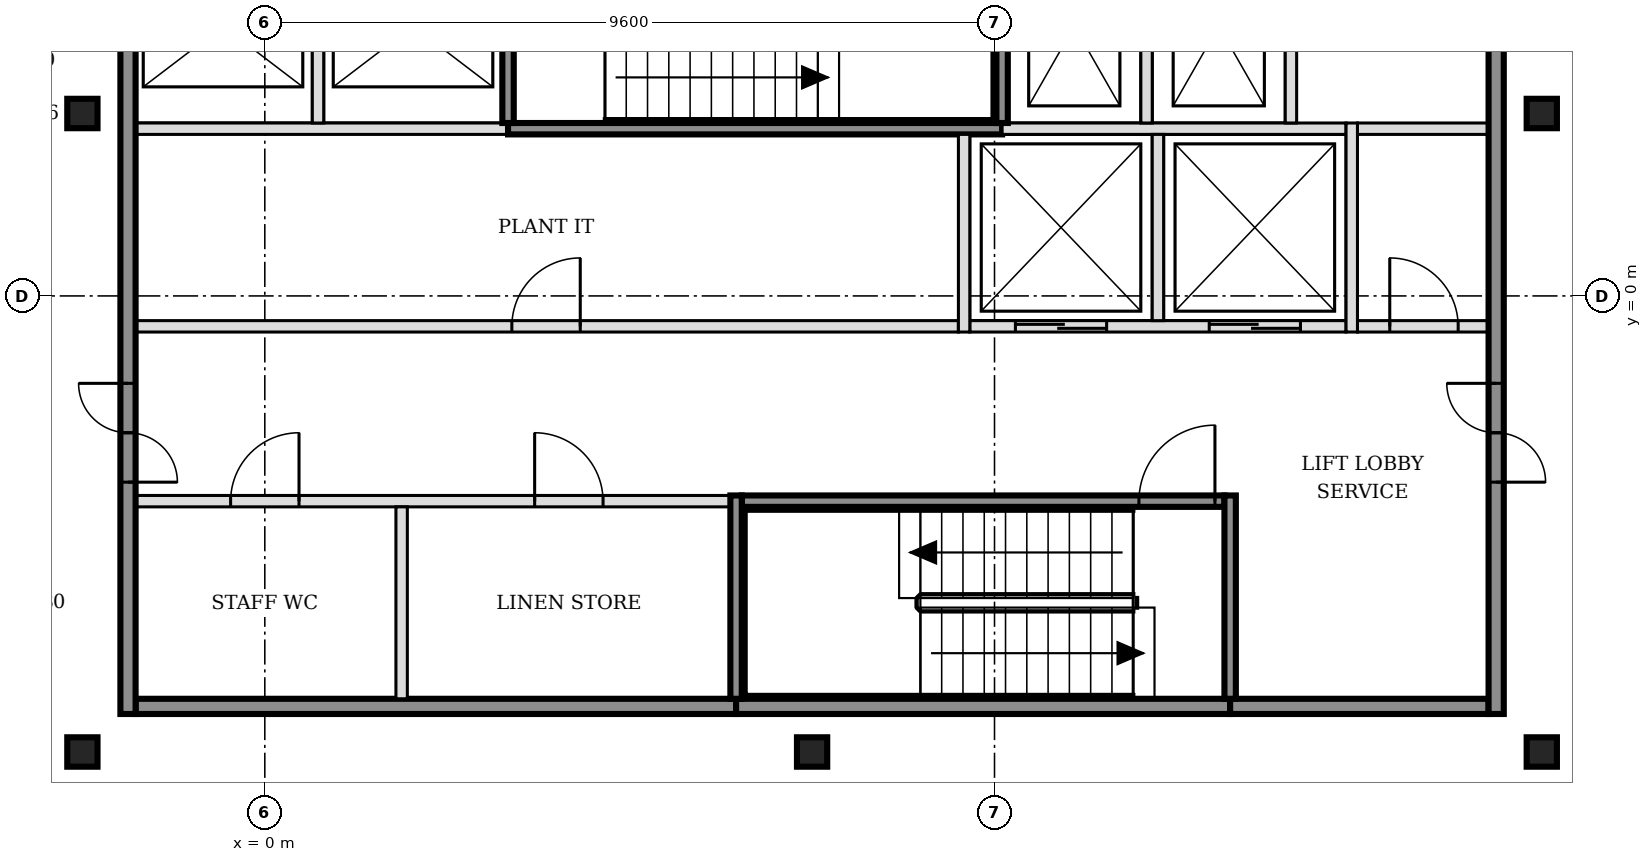
"""IFC4 building model, lengths in metres.
Left out: names, types, materials, properties, quantities, classifications, styles, units other than length and angle.
Written with IfcOpenShell. Run it as: python <this file> out.ifc"""

import sys

from ifc_helpers import new_model, si_unit, direction, frame, frame_2d, origin, origin_2d, place, context, subcontext, project, spatial, rectangle, i_section, extrude, element, fill, save


model = new_model("IFC4")
c1 = context("Model", 3, precision=1e-05, world=origin(), true_north=direction((0.0, 1.0)))
c2 = subcontext(c1, "Body", "Model", "MODEL_VIEW")
j1 = project(units=[si_unit("LENGTHUNIT", "METRE"), si_unit("PLANEANGLEUNIT", "RADIAN")], contexts=[c1])
p1 = place(None, origin())
s1 = spatial("IfcSite", under=j1, at=p1, CompositionType="ELEMENT")
p2 = place(p1, origin())
s2 = spatial("IfcBuilding", under=s1, at=p2, CompositionType="ELEMENT")
p3 = place(p2, frame((0.0, 0.0, 246.6)))
s3 = spatial("IfcBuildingStorey", under=s2, at=p3, CompositionType="ELEMENT", Elevation=246.6)
for number, where, z_axis, x_axis in (
    (1, (-2.4, -6.0, -0.15), (0.0, 0.0, 1.0), (1.0, 0.0, 0.0)),
    (2, (7.2, -6.0, -0.15), (0.0, 0.0, 1.0), (1.0, 0.0, 0.0)),
    (3, (16.8, -6.0, -0.15), (0.0, 0.0, 1.0), (1.0, 0.0, 0.0)),
    (4, (-2.4, 2.4, -0.15), (0.0, 0.0, 1.0), (1.0, 0.0, 0.0)),
    (5, (16.8, 2.4, -0.15), (0.0, 0.0, 1.0), (1.0, 0.0, 0.0)),
):
    element("IfcColumn", number, at=place(p3, frame(where, z_axis=z_axis, x_axis=x_axis)), inside=s3, PredefinedType="COLUMN", context=c2, shape_type="SweptSolid", body=[
        extrude(i_section(OverallWidth=0.398, OverallDepth=0.387, WebThickness=0.021, FlangeThickness=0.033, FilletRadius=0.015, at=origin_2d()), origin(), (0.0, 0.0, 1.0), 3.6),
    ])
p4 = place(p3, frame((-1.7, -5.4, 0.0), z_axis=(0.0, 0.0, 1.0), x_axis=(1.0, 0.0, 0.0)))
e6 = element("IfcWall", 6, at=p4, inside=s3, PredefinedType="SOLIDWALL", context=c2, shape_type="SweptSolid", body=[
    extrude(rectangle(XDim=7.9, YDim=0.2, at=frame_2d((3.95, 0.0))), origin(), (0.0, 0.0, 1.0), 3.45),
])
p5 = place(p3, frame((6.2, -5.4, 0.0), z_axis=(0.0, 0.0, 1.0), x_axis=(1.0, 0.0, 0.0)))
e7 = element("IfcWall", 7, at=p5, inside=s3, PredefinedType="SOLIDWALL", context=c2, shape_type="SweptSolid", body=[
    extrude(rectangle(XDim=6.5, YDim=0.2, at=frame_2d((3.25, 0.0))), origin(), (0.0, 0.0, 1.0), 3.45),
])
p6 = place(p3, frame((12.7, -5.4, 0.0), z_axis=(0.0, 0.0, 1.0), x_axis=(1.0, 0.0, 0.0)))
e8 = element("IfcWall", 8, at=p6, inside=s3, PredefinedType="SOLIDWALL", context=c2, shape_type="SweptSolid", body=[
    extrude(rectangle(XDim=3.4, YDim=0.2, at=frame_2d((1.7, 0.0))), origin(), (0.0, 0.0, 1.0), 3.45),
])
p7 = place(p3, frame((-1.7, -2.7, 0.0), z_axis=(0.0, 0.0, 1.0), x_axis=(1.0, 0.0, 0.0)))
e9 = element("IfcWall", 9, at=p7, inside=s3, PredefinedType="PARTITIONING", context=c2, shape_type="SweptSolid", body=[
    extrude(rectangle(XDim=7.825, YDim=0.15, at=frame_2d((3.913, 0.0))), origin(), (0.0, 0.0, 1.0), 3.45),
])
p8 = place(p7, frame((1.25, 0.0, 0.0)))
e10 = element("IfcOpeningElement", 10, at=p8, cuts=e9, PredefinedType="OPENING", context=c2, shape_type="SweptSolid", body=[
    extrude(rectangle(XDim=0.9, YDim=2.1, at=frame_2d((0.45, 1.05))), frame((0.0, 0.085, 0.0), z_axis=(0.0, -1.0, 0.0), x_axis=(1.0, 0.0, 0.0)), (0.0, 0.0, 1.0), 0.17),
])
p9 = place(p7, frame((5.25, 0.0, 0.0)))
e11 = element("IfcOpeningElement", 11, at=p9, cuts=e9, PredefinedType="OPENING", context=c2, shape_type="SweptSolid", body=[
    extrude(rectangle(XDim=0.9, YDim=2.1, at=frame_2d((0.45, 1.05))), frame((0.0, 0.085, 0.0), z_axis=(0.0, -1.0, 0.0), x_axis=(1.0, 0.0, 0.0)), (0.0, 0.0, 1.0), 0.17),
])
p10 = place(p3, frame((6.275, -2.7, 0.0), z_axis=(0.0, 0.0, 1.0), x_axis=(1.0, 0.0, 0.0)))
e12 = element("IfcWall", 12, at=p10, inside=s3, PredefinedType="SOLIDWALL", context=c2, shape_type="SweptSolid", body=[
    extrude(rectangle(XDim=6.35, YDim=0.15, at=frame_2d((3.175, 0.0))), origin(), (0.0, 0.0, 1.0), 3.45),
])
p11 = place(p10, frame((5.225, 0.0, 0.0)))
e13 = element("IfcOpeningElement", 13, at=p11, cuts=e12, PredefinedType="OPENING", context=c2, shape_type="SweptSolid", body=[
    extrude(rectangle(XDim=1.0, YDim=2.1, at=frame_2d((0.5, 1.05))), frame((0.0, 0.085, 0.0), z_axis=(0.0, -1.0, 0.0), x_axis=(1.0, 0.0, 0.0)), (0.0, 0.0, 1.0), 0.17),
])
p12 = place(p3, frame((-1.7, -0.4, 0.0), z_axis=(0.0, 0.0, 1.0), x_axis=(1.0, 0.0, 0.0)))
e14 = element("IfcWall", 14, at=p12, inside=s3, PredefinedType="PARTITIONING", context=c2, shape_type="SweptSolid", body=[
    extrude(rectangle(XDim=10.825, YDim=0.15, at=frame_2d((5.413, 0.0))), origin(), (0.0, 0.0, 1.0), 3.45),
])
p13 = place(p12, frame((4.95, 0.0, 0.0)))
e15 = element("IfcOpeningElement", 15, at=p13, cuts=e14, PredefinedType="OPENING", context=c2, shape_type="SweptSolid", body=[
    extrude(rectangle(XDim=0.9, YDim=2.1, at=frame_2d((0.45, 1.05))), frame((0.0, 0.085, 0.0), z_axis=(0.0, -1.0, 0.0), x_axis=(1.0, 0.0, 0.0)), (0.0, 0.0, 1.0), 0.17),
])
p14 = place(p3, frame((9.275, -0.4, 0.0), z_axis=(0.0, 0.0, 1.0), x_axis=(1.0, 0.0, 0.0)))
e16 = element("IfcWall", 16, at=p14, inside=s3, PredefinedType="SOLIDWALL", context=c2, shape_type="SweptSolid", body=[
    extrude(rectangle(XDim=4.95, YDim=0.15, at=frame_2d((2.475, 0.0))), origin(), (0.0, 0.0, 1.0), 3.45),
])
p15 = place(p14, frame((0.6, 0.0, 0.0)))
e17 = element("IfcOpeningElement", 17, at=p15, cuts=e16, PredefinedType="OPENING", context=c2, shape_type="SweptSolid", body=[
    extrude(rectangle(XDim=1.2, YDim=2.1, at=frame_2d((0.6, 1.05))), frame((0.0, 0.085, 0.0), z_axis=(0.0, -1.0, 0.0), x_axis=(1.0, 0.0, 0.0)), (0.0, 0.0, 1.0), 0.17),
])
p16 = place(p14, frame((3.15, 0.0, 0.0)))
e18 = element("IfcOpeningElement", 18, at=p16, cuts=e16, PredefinedType="OPENING", context=c2, shape_type="SweptSolid", body=[
    extrude(rectangle(XDim=1.2, YDim=2.1, at=frame_2d((0.6, 1.05))), frame((0.0, 0.085, 0.0), z_axis=(0.0, -1.0, 0.0), x_axis=(1.0, 0.0, 0.0)), (0.0, 0.0, 1.0), 0.17),
])
p17 = place(p3, frame((14.375, -0.4, 0.0), z_axis=(0.0, 0.0, 1.0), x_axis=(1.0, 0.0, 0.0)))
e19 = element("IfcWall", 19, at=p17, inside=s3, PredefinedType="PARTITIONING", context=c2, shape_type="SweptSolid", body=[
    extrude(rectangle(XDim=1.725, YDim=0.15, at=frame_2d((0.863, 0.0))), origin(), (0.0, 0.0, 1.0), 3.45),
])
p18 = place(p17, frame((0.425, 0.0, 0.0)))
e20 = element("IfcOpeningElement", 20, at=p18, cuts=e19, PredefinedType="OPENING", context=c2, shape_type="SweptSolid", body=[
    extrude(rectangle(XDim=0.9, YDim=2.1, at=frame_2d((0.45, 1.05))), frame((0.0, 0.085, 0.0), z_axis=(0.0, -1.0, 0.0), x_axis=(1.0, 0.0, 0.0)), (0.0, 0.0, 1.0), 0.17),
])
p19 = place(p3, frame((-1.7, 2.2, 0.0), z_axis=(0.0, 0.0, 1.0), x_axis=(1.0, 0.0, 0.0)))
e21 = element("IfcWall", 21, at=p19, inside=s3, PredefinedType="SOLIDWALL", context=c2, shape_type="SweptSolid", body=[
    extrude(rectangle(XDim=4.9, YDim=0.15, at=frame_2d((2.45, 0.0))), origin(), (0.0, 0.0, 1.0), 3.45),
])
p20 = place(p3, frame((3.2, 2.2, 0.0), z_axis=(0.0, 0.0, 1.0), x_axis=(1.0, 0.0, 0.0)))
e22 = element("IfcWall", 22, at=p20, inside=s3, PredefinedType="SOLIDWALL", context=c2, shape_type="SweptSolid", body=[
    extrude(rectangle(XDim=6.5, YDim=0.15, at=frame_2d((3.25, 0.0))), origin(), (0.0, 0.0, 1.0), 3.45),
])
p21 = place(p3, frame((9.7, 2.2, 0.0), z_axis=(0.0, 0.0, 1.0), x_axis=(1.0, 0.0, 0.0)))
e23 = element("IfcWall", 23, at=p21, inside=s3, PredefinedType="SOLIDWALL", context=c2, shape_type="SweptSolid", body=[
    extrude(rectangle(XDim=4.525, YDim=0.15, at=frame_2d((2.263, 0.0))), origin(), (0.0, 0.0, 1.0), 3.45),
])
p22 = place(p3, frame((14.375, 2.2, 0.0), z_axis=(0.0, 0.0, 1.0), x_axis=(1.0, 0.0, 0.0)))
e24 = element("IfcWall", 24, at=p22, inside=s3, PredefinedType="PARTITIONING", context=c2, shape_type="SweptSolid", body=[
    extrude(rectangle(XDim=1.725, YDim=0.15, at=frame_2d((0.863, 0.0))), origin(), (0.0, 0.0, 1.0), 3.45),
])
p23 = place(p3, frame((-1.8, -5.5, 0.0), z_axis=(0.0, 0.0, 1.0), x_axis=(0.0, 1.0, 0.0)))
e25 = element("IfcWall", 25, at=p23, inside=s3, PredefinedType="SOLIDWALL", context=c2, shape_type="SweptSolid", body=[
    extrude(rectangle(XDim=15.8, YDim=0.2, at=frame_2d((7.9, 0.0))), origin(), (0.0, 0.0, 1.0), 3.45),
])
p24 = place(p23, frame((3.05, 0.0, 0.0)))
e26 = element("IfcOpeningElement", 26, at=p24, cuts=e25, PredefinedType="OPENING", context=c2, shape_type="SweptSolid", body=[
    extrude(rectangle(XDim=1.3, YDim=2.1, at=frame_2d((0.65, 1.05))), frame((0.0, 0.11, 0.0), z_axis=(0.0, -1.0, 0.0), x_axis=(1.0, 0.0, 0.0)), (0.0, 0.0, 1.0), 0.22),
])
p25 = place(p23, frame((11.45, 0.0, 0.0)))
e27 = element("IfcOpeningElement", 27, at=p25, cuts=e25, PredefinedType="OPENING", context=c2, shape_type="SweptSolid", body=[
    extrude(rectangle(XDim=1.3, YDim=2.1, at=frame_2d((0.65, 1.05))), frame((0.0, 0.11, 0.0), z_axis=(0.0, -1.0, 0.0), x_axis=(1.0, 0.0, 0.0)), (0.0, 0.0, 1.0), 0.22),
])
p26 = place(p3, frame((0.7, 2.275, 0.0), z_axis=(0.0, 0.0, 1.0), x_axis=(0.0, 1.0, 0.0)))
e28 = element("IfcWall", 28, at=p26, inside=s3, PredefinedType="SOLIDWALL", context=c2, shape_type="SweptSolid", body=[
    extrude(rectangle(XDim=2.55, YDim=0.15, at=frame_2d((1.275, 0.0))), origin(), (0.0, 0.0, 1.0), 3.45),
])
p27 = place(p3, frame((1.8, -5.3, 0.0), z_axis=(0.0, 0.0, 1.0), x_axis=(0.0, 1.0, 0.0)))
e29 = element("IfcWall", 29, at=p27, inside=s3, PredefinedType="PARTITIONING", context=c2, shape_type="SweptSolid", body=[
    extrude(rectangle(XDim=2.525, YDim=0.15, at=frame_2d((1.263, 0.0))), origin(), (0.0, 0.0, 1.0), 3.45),
])
p28 = place(p3, frame((3.2, 2.275, 0.0), z_axis=(0.0, 0.0, 1.0), x_axis=(0.0, 1.0, 0.0)))
e30 = element("IfcWall", 30, at=p28, inside=s3, PredefinedType="SOLIDWALL", context=c2, shape_type="SweptSolid", body=[
    extrude(rectangle(XDim=2.55, YDim=0.15, at=frame_2d((1.275, 0.0))), origin(), (0.0, 0.0, 1.0), 3.45),
])
p29 = place(p3, frame((6.2, -5.3, 0.0), z_axis=(0.0, 0.0, 1.0), x_axis=(0.0, 1.0, 0.0)))
e31 = element("IfcWall", 31, at=p29, inside=s3, PredefinedType="SOLIDWALL", context=c2, shape_type="SweptSolid", body=[
    extrude(rectangle(XDim=2.675, YDim=0.15, at=frame_2d((1.337, 0.0))), origin(), (0.0, 0.0, 1.0), 3.45),
])
p30 = place(p3, frame((9.2, -0.475, 0.0), z_axis=(0.0, 0.0, 1.0), x_axis=(0.0, 1.0, 0.0)))
e32 = element("IfcWall", 32, at=p30, inside=s3, PredefinedType="SOLIDWALL", context=c2, shape_type="SweptSolid", body=[
    extrude(rectangle(XDim=2.6, YDim=0.15, at=frame_2d((1.3, 0.0))), origin(), (0.0, 0.0, 1.0), 3.45),
])
for number, where, z_axis, x_axis in (
    (33, (9.7, 2.275, 0.0), (0.0, 0.0, 1.0), (0.0, 1.0, 0.0)),
    (34, (11.6, 2.275, 0.0), (0.0, 0.0, 1.0), (0.0, 1.0, 0.0)),
):
    element("IfcWall", number, at=place(p3, frame(where, z_axis=z_axis, x_axis=x_axis)), inside=s3, PredefinedType="SOLIDWALL", context=c2, shape_type="SweptSolid", body=[
        extrude(rectangle(XDim=2.55, YDim=0.15, at=frame_2d((1.275, 0.0))), origin(), (0.0, 0.0, 1.0), 3.45),
    ])
p31 = place(p3, frame((11.75, -0.325, 0.0), z_axis=(0.0, 0.0, 1.0), x_axis=(0.0, 1.0, 0.0)))
e35 = element("IfcWall", 35, at=p31, inside=s3, PredefinedType="SOLIDWALL", context=c2, shape_type="SweptSolid", body=[
    extrude(rectangle(XDim=2.45, YDim=0.15, at=frame_2d((1.225, 0.0))), origin(), (0.0, 0.0, 1.0), 3.45),
])
p32 = place(p3, frame((12.7, -5.3, 0.0), z_axis=(0.0, 0.0, 1.0), x_axis=(0.0, 1.0, 0.0)))
e36 = element("IfcWall", 36, at=p32, inside=s3, PredefinedType="SOLIDWALL", context=c2, shape_type="SweptSolid", body=[
    extrude(rectangle(XDim=2.675, YDim=0.15, at=frame_2d((1.337, 0.0))), origin(), (0.0, 0.0, 1.0), 3.45),
])
p33 = place(p3, frame((13.5, 2.275, 0.0), z_axis=(0.0, 0.0, 1.0), x_axis=(0.0, 1.0, 0.0)))
e37 = element("IfcWall", 37, at=p33, inside=s3, PredefinedType="SOLIDWALL", context=c2, shape_type="SweptSolid", body=[
    extrude(rectangle(XDim=2.55, YDim=0.15, at=frame_2d((1.275, 0.0))), origin(), (0.0, 0.0, 1.0), 3.45),
])
p34 = place(p3, frame((14.3, -0.475, 0.0), z_axis=(0.0, 0.0, 1.0), x_axis=(0.0, 1.0, 0.0)))
e38 = element("IfcWall", 38, at=p34, inside=s3, PredefinedType="SOLIDWALL", context=c2, shape_type="SweptSolid", body=[
    extrude(rectangle(XDim=2.75, YDim=0.15, at=frame_2d((1.375, 0.0))), origin(), (0.0, 0.0, 1.0), 3.45),
])
p35 = place(p3, frame((16.2, -5.5, 0.0), z_axis=(0.0, 0.0, 1.0), x_axis=(0.0, 1.0, 0.0)))
e39 = element("IfcWall", 39, at=p35, inside=s3, PredefinedType="SOLIDWALL", context=c2, shape_type="SweptSolid", body=[
    extrude(rectangle(XDim=15.8, YDim=0.2, at=frame_2d((7.9, 0.0))), origin(), (0.0, 0.0, 1.0), 3.45),
])
p36 = place(p35, frame((3.05, 0.0, 0.0)))
e40 = element("IfcOpeningElement", 40, at=p36, cuts=e39, PredefinedType="OPENING", context=c2, shape_type="SweptSolid", body=[
    extrude(rectangle(XDim=1.3, YDim=2.1, at=frame_2d((0.65, 1.05))), frame((0.0, 0.11, 0.0), z_axis=(0.0, -1.0, 0.0), x_axis=(1.0, 0.0, 0.0)), (0.0, 0.0, 1.0), 0.22),
])
p37 = place(p35, frame((11.45, 0.0, 0.0)))
e41 = element("IfcOpeningElement", 41, at=p37, cuts=e39, PredefinedType="OPENING", context=c2, shape_type="SweptSolid", body=[
    extrude(rectangle(XDim=1.3, YDim=2.1, at=frame_2d((0.65, 1.05))), frame((0.0, 0.11, 0.0), z_axis=(0.0, -1.0, 0.0), x_axis=(1.0, 0.0, 0.0)), (0.0, 0.0, 1.0), 0.22),
])
p38 = place(p15, origin())
e42 = element("IfcDoor", 42, at=p38, inside=s3, OperationType="DOUBLE_DOOR_SLIDING", PredefinedType="DOOR", context=c2, shape_type="SweptSolid", body=[
    extrude(rectangle(XDim=1.2, YDim=2.1, at=frame_2d((0.6, 1.05))), frame((0.0, 0.025, 0.0), z_axis=(0.0, -1.0, 0.0), x_axis=(1.0, 0.0, 0.0)), (0.0, 0.0, 1.0), 0.05),
])
fill(e17, e42)
p39 = place(p16, origin())
e43 = element("IfcDoor", 43, at=p39, inside=s3, OperationType="DOUBLE_DOOR_SLIDING", PredefinedType="DOOR", context=c2, shape_type="SweptSolid", body=[
    extrude(rectangle(XDim=1.2, YDim=2.1, at=frame_2d((0.6, 1.05))), frame((0.0, 0.025, 0.0), z_axis=(0.0, -1.0, 0.0), x_axis=(1.0, 0.0, 0.0)), (0.0, 0.0, 1.0), 0.05),
])
fill(e18, e43)
p40 = place(p11, origin())
e44 = element("IfcDoor", 44, at=p40, inside=s3, OperationType="SINGLE_SWING_RIGHT", PredefinedType="DOOR", context=c2, shape_type="SweptSolid", body=[
    extrude(rectangle(XDim=1.0, YDim=2.1, at=frame_2d((0.5, 1.05))), frame((0.0, 0.025, 0.0), z_axis=(0.0, -1.0, 0.0), x_axis=(1.0, 0.0, 0.0)), (0.0, 0.0, 1.0), 0.05),
])
fill(e13, e44)
p41 = place(p24, origin())
e45 = element("IfcDoor", 45, at=p41, inside=s3, OperationType="DOUBLE_DOOR_SINGLE_SWING", PredefinedType="DOOR", context=c2, shape_type="SweptSolid", body=[
    extrude(rectangle(XDim=1.3, YDim=2.1, at=frame_2d((0.65, 1.05))), frame((0.0, 0.025, 0.0), z_axis=(0.0, -1.0, 0.0), x_axis=(1.0, 0.0, 0.0)), (0.0, 0.0, 1.0), 0.05),
])
fill(e26, e45)
p42 = place(p36, origin())
e46 = element("IfcDoor", 46, at=p42, inside=s3, OperationType="DOUBLE_DOOR_SINGLE_SWING", PredefinedType="DOOR", context=c2, shape_type="SweptSolid", body=[
    extrude(rectangle(XDim=1.3, YDim=2.1, at=frame_2d((0.65, 1.05))), frame((0.0, 0.025, 0.0), z_axis=(0.0, -1.0, 0.0), x_axis=(1.0, 0.0, 0.0)), (0.0, 0.0, 1.0), 0.05),
])
fill(e40, e46)
p43 = place(p18, origin())
e47 = element("IfcDoor", 47, at=p43, inside=s3, OperationType="SINGLE_SWING_LEFT", PredefinedType="DOOR", context=c2, shape_type="SweptSolid", body=[
    extrude(rectangle(XDim=0.9, YDim=2.1, at=frame_2d((0.45, 1.05))), frame((0.0, 0.025, 0.0), z_axis=(0.0, -1.0, 0.0), x_axis=(1.0, 0.0, 0.0)), (0.0, 0.0, 1.0), 0.05),
])
fill(e20, e47)
p44 = place(p8, origin())
e48 = element("IfcDoor", 48, at=p44, inside=s3, OperationType="SINGLE_SWING_RIGHT", PredefinedType="DOOR", context=c2, shape_type="SweptSolid", body=[
    extrude(rectangle(XDim=0.9, YDim=2.1, at=frame_2d((0.45, 1.05))), frame((0.0, 0.025, 0.0), z_axis=(0.0, -1.0, 0.0), x_axis=(1.0, 0.0, 0.0)), (0.0, 0.0, 1.0), 0.05),
])
fill(e10, e48)
p45 = place(p9, origin())
e49 = element("IfcDoor", 49, at=p45, inside=s3, OperationType="SINGLE_SWING_LEFT", PredefinedType="DOOR", context=c2, shape_type="SweptSolid", body=[
    extrude(rectangle(XDim=0.9, YDim=2.1, at=frame_2d((0.45, 1.05))), frame((0.0, 0.025, 0.0), z_axis=(0.0, -1.0, 0.0), x_axis=(1.0, 0.0, 0.0)), (0.0, 0.0, 1.0), 0.05),
])
fill(e11, e49)
p46 = place(p13, origin())
e50 = element("IfcDoor", 50, at=p46, inside=s3, OperationType="SINGLE_SWING_RIGHT", PredefinedType="DOOR", context=c2, shape_type="SweptSolid", body=[
    extrude(rectangle(XDim=0.9, YDim=2.1, at=frame_2d((0.45, 1.05))), frame((0.0, 0.025, 0.0), z_axis=(0.0, -1.0, 0.0), x_axis=(1.0, 0.0, 0.0)), (0.0, 0.0, 1.0), 0.05),
])
fill(e15, e50)
save(model, sys.argv[1])
